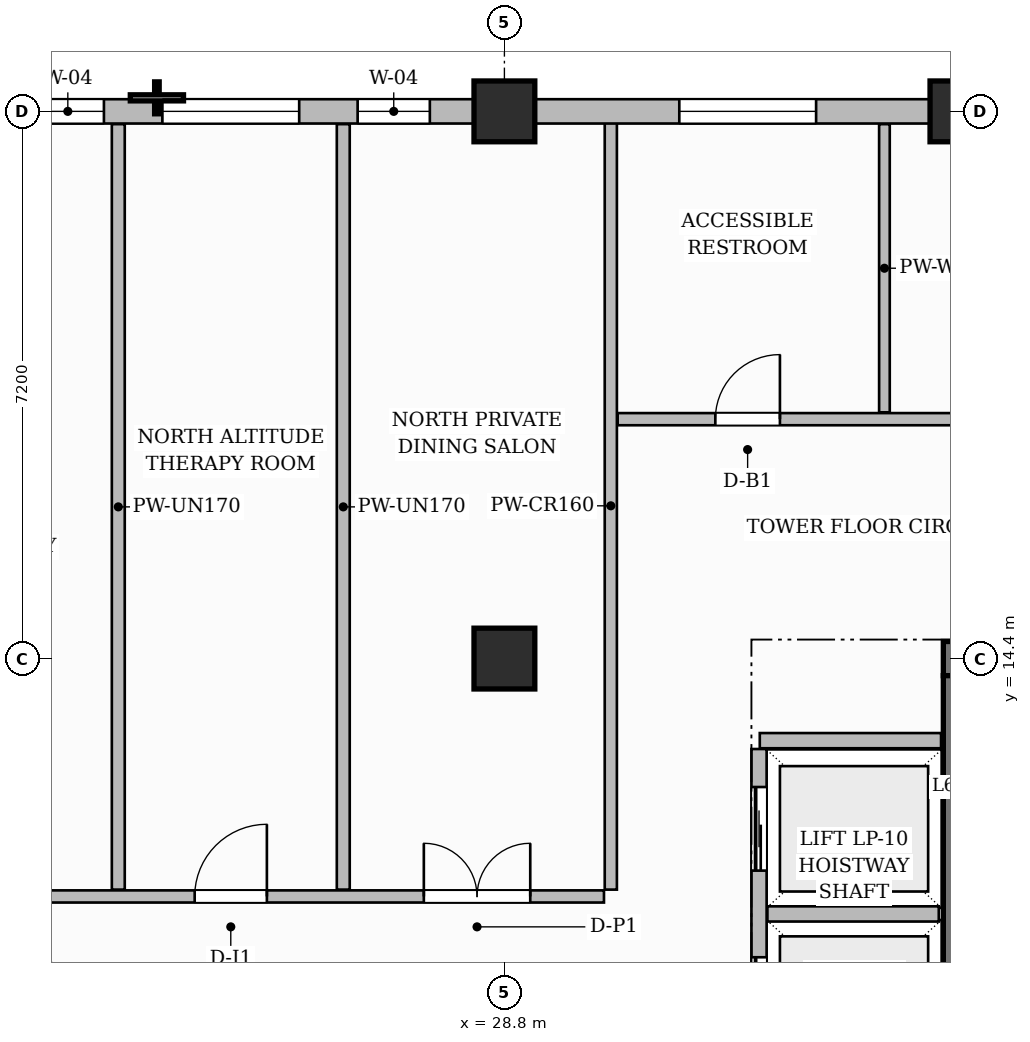
"""IFC4 building model, lengths in metres.
Left out: names, types, materials, properties, quantities, classifications, styles, units other than length and angle.
Written with IfcOpenShell. Run it as: python <this file> out.ifc"""

import sys

from ifc_helpers import new_model, si_unit, direction, frame, frame_2d, origin, origin_2d, place, context, subcontext, project, spatial, rectangle, extrude, source, transform, mapped, element, fill, save


model = new_model("IFC4")
c1 = context("Model", 3, precision=1e-05, world=origin(), true_north=direction((0.0, 1.0)))
c2 = subcontext(c1, "Body", "Model", "MODEL_VIEW")
j1 = project(units=[si_unit("LENGTHUNIT", "METRE"), si_unit("PLANEANGLEUNIT", "RADIAN")], contexts=[c1])
p1 = place(None, origin())
s1 = spatial("IfcSite", under=j1, at=p1, CompositionType="ELEMENT")
p2 = place(p1, origin())
s2 = spatial("IfcBuilding", under=s1, at=p2, CompositionType="ELEMENT")
p3 = place(p2, frame((0.0, 0.0, 263.5)))
s3 = spatial("IfcBuildingStorey", under=s2, at=p3, CompositionType="ELEMENT", Elevation=263.5)
p4 = place(p3, frame((34.575, 14.4, 0.0), z_axis=(0.0, 0.0, 1.0), x_axis=(1.0, 0.0, 0.0)))
e1 = element("IfcWall", 1, at=p4, inside=s3, PredefinedType="SHEAR", context=c2, shape_type="SweptSolid", body=[
    extrude(rectangle(XDim=15.45, YDim=0.45, at=frame_2d((7.725, 0.0))), origin(), (0.0, 0.0, 1.0), 3.85),
])
p5 = place(p4, frame((5.355, 0.0, 0.0)))
e2 = element("IfcOpeningElement", 2, at=p5, cuts=e1, PredefinedType="OPENING", context=c2, shape_type="SweptSolid", body=[
    extrude(rectangle(XDim=1.5, YDim=2.2, at=frame_2d((0.75, 1.1))), frame((0.0, 0.235, 0.0), z_axis=(0.0, -1.0, 0.0), x_axis=(1.0, 0.0, 0.0)), (0.0, 0.0, 1.0), 0.47),
])
p6 = place(p4, frame((1.57, 0.0, 0.0)))
e3 = element("IfcOpeningElement", 3, at=p6, cuts=e1, PredefinedType="OPENING", context=c2, shape_type="SweptSolid", body=[
    extrude(rectangle(XDim=1.05, YDim=2.15, at=frame_2d((0.525, 1.075))), frame((0.0, 0.235, 0.0), z_axis=(0.0, -1.0, 0.0), x_axis=(1.0, 0.0, 0.0)), (0.0, 0.0, 1.0), 0.47),
])
p7 = place(p4, frame((11.2, 0.0, 0.0)))
e4 = element("IfcOpeningElement", 4, at=p7, cuts=e1, PredefinedType="OPENING", context=c2, shape_type="SweptSolid", body=[
    extrude(rectangle(XDim=1.05, YDim=2.15, at=frame_2d((0.525, 1.075))), frame((0.0, 0.235, 0.0), z_axis=(0.0, -1.0, 0.0), x_axis=(1.0, 0.0, 0.0)), (0.0, 0.0, 1.0), 0.47),
])
p8 = place(p3, frame((34.8, 3.825, 0.0), z_axis=(0.0, 0.0, 1.0), x_axis=(0.0, 1.0, 0.0)))
e5 = element("IfcWall", 5, at=p8, inside=s3, PredefinedType="SHEAR", context=c2, shape_type="SweptSolid", body=[
    extrude(rectangle(XDim=10.35, YDim=0.45, at=frame_2d((5.175, 0.0))), origin(), (0.0, 0.0, 1.0), 3.85),
])
m1 = source(origin(), c2, "Body", "SweptSolid", [
    extrude(rectangle(XDim=0.8, YDim=0.8, at=origin_2d()), origin(), (0.0, 0.0, 1.0), 3.85),
])
for number, where, z_axis, x_axis in (
    (6, (28.8, 14.4, 0.0), (0.0, 0.0, 1.0), (1.0, 0.0, 0.0)),
    (7, (28.8, 21.6, 0.0), (0.0, 0.0, 1.0), (1.0, 0.0, 0.0)),
    (8, (34.8, 21.6, 0.0), (0.0, 0.0, 1.0), (1.0, 0.0, 0.0)),
):
    element("IfcColumn", number, at=place(p3, frame(where, z_axis=z_axis, x_axis=x_axis)), inside=s3, PredefinedType="COLUMN", context=c2, shape_type="MappedRepresentation", body=[
        mapped(m1, transform((0.0, 0.0, 0.0), scale=1.0)),
    ])
p9 = place(p3, frame((32.16, 13.32, 0.0), z_axis=(0.0, 0.0, 1.0), x_axis=(1.0, 0.0, 0.0)))
e9 = element("IfcWall", 9, at=p9, inside=s3, PredefinedType="PARTITIONING", context=c2, shape_type="SweptSolid", body=[
    extrude(rectangle(XDim=2.385, YDim=0.2, at=frame_2d((1.192, 0.0))), origin(), (0.0, 0.0, 1.0), 3.6),
])
p10 = place(p3, frame((32.15, 4.39, 0.0), z_axis=(0.0, 0.0, 1.0), x_axis=(0.0, 1.0, 0.0)))
e10 = element("IfcWall", 10, at=p10, inside=s3, PredefinedType="PARTITIONING", context=c2, shape_type="SweptSolid", body=[
    extrude(rectangle(XDim=8.82, YDim=0.2, at=frame_2d((4.41, 0.0))), origin(), (0.0, 0.0, 1.0), 3.6),
])
p11 = place(p10, frame((0.5, 0.0, 0.0)))
e11 = element("IfcOpeningElement", 11, at=p11, cuts=e10, PredefinedType="OPENING", context=c2, shape_type="SweptSolid", body=[
    extrude(rectangle(XDim=1.1, YDim=2.2, at=frame_2d((0.55, 1.1))), frame((0.0, 0.11, 0.0), z_axis=(0.0, -1.0, 0.0), x_axis=(1.0, 0.0, 0.0)), (0.0, 0.0, 1.0), 0.22),
])
p12 = place(p10, frame((2.74, 0.0, 0.0)))
e12 = element("IfcOpeningElement", 12, at=p12, cuts=e10, PredefinedType="OPENING", context=c2, shape_type="SweptSolid", body=[
    extrude(rectangle(XDim=1.1, YDim=2.2, at=frame_2d((0.55, 1.1))), frame((0.0, 0.11, 0.0), z_axis=(0.0, -1.0, 0.0), x_axis=(1.0, 0.0, 0.0)), (0.0, 0.0, 1.0), 0.22),
])
p13 = place(p10, frame((4.98, 0.0, 0.0)))
e13 = element("IfcOpeningElement", 13, at=p13, cuts=e10, PredefinedType="OPENING", context=c2, shape_type="SweptSolid", body=[
    extrude(rectangle(XDim=1.1, YDim=2.2, at=frame_2d((0.55, 1.1))), frame((0.0, 0.11, 0.0), z_axis=(0.0, -1.0, 0.0), x_axis=(1.0, 0.0, 0.0)), (0.0, 0.0, 1.0), 0.22),
])
p14 = place(p10, frame((7.22, 0.0, 0.0)))
e14 = element("IfcOpeningElement", 14, at=p14, cuts=e10, PredefinedType="OPENING", context=c2, shape_type="SweptSolid", body=[
    extrude(rectangle(XDim=1.1, YDim=2.2, at=frame_2d((0.55, 1.1))), frame((0.0, 0.11, 0.0), z_axis=(0.0, -1.0, 0.0), x_axis=(1.0, 0.0, 0.0)), (0.0, 0.0, 1.0), 0.22),
])
p15 = place(p3, frame((32.26, 11.04, 0.0), z_axis=(0.0, 0.0, 1.0), x_axis=(1.0, 0.0, 0.0)))
e15 = element("IfcWall", 15, at=p15, inside=s3, PredefinedType="PARTITIONING", context=c2, shape_type="SweptSolid", body=[
    extrude(rectangle(XDim=2.255, YDim=0.2, at=frame_2d((1.127, 0.0))), origin(), (0.0, 0.0, 1.0), 3.6),
])
p16 = place(p3, frame((18.168, 11.27, 0.0), z_axis=(0.0, 0.0, 1.0), x_axis=(1.0, 0.0, 0.0)))
e16 = element("IfcWall", 16, at=p16, inside=s3, PredefinedType="PARTITIONING", context=c2, shape_type="SweptSolid", body=[
    extrude(rectangle(XDim=11.942, YDim=0.16, at=frame_2d((5.971, 0.0))), origin(), (0.0, 0.0, 1.0), 3.6),
])
p17 = place(p16, frame((2.217, 0.0, 0.0)))
e17 = element("IfcOpeningElement", 17, at=p17, cuts=e16, PredefinedType="OPENING", context=c2, shape_type="SweptSolid", body=[
    extrude(rectangle(XDim=0.95, YDim=2.15, at=frame_2d((0.475, 1.075))), frame((0.0, 0.09, 0.0), z_axis=(0.0, -1.0, 0.0), x_axis=(1.0, 0.0, 0.0)), (0.0, 0.0, 1.0), 0.18),
])
p18 = place(p16, frame((6.557, 0.0, 0.0)))
e18 = element("IfcOpeningElement", 18, at=p18, cuts=e16, PredefinedType="OPENING", context=c2, shape_type="SweptSolid", body=[
    extrude(rectangle(XDim=0.95, YDim=2.15, at=frame_2d((0.475, 1.075))), frame((0.0, 0.09, 0.0), z_axis=(0.0, -1.0, 0.0), x_axis=(1.0, 0.0, 0.0)), (0.0, 0.0, 1.0), 0.18),
])
p19 = place(p16, frame((9.572, 0.0, 0.0)))
e19 = element("IfcOpeningElement", 19, at=p19, cuts=e16, PredefinedType="OPENING", context=c2, shape_type="SweptSolid", body=[
    extrude(rectangle(XDim=1.4, YDim=2.35, at=frame_2d((0.7, 1.175))), frame((0.0, 0.09, 0.0), z_axis=(0.0, -1.0, 0.0), x_axis=(1.0, 0.0, 0.0)), (0.0, 0.0, 1.0), 0.18),
])
p20 = place(p3, frame((30.2, 11.36, 0.0), z_axis=(0.0, 0.0, 1.0), x_axis=(0.0, 1.0, 0.0)))
e20 = element("IfcWall", 20, at=p20, inside=s3, PredefinedType="PARTITIONING", context=c2, shape_type="SweptSolid", body=[
    extrude(rectangle(XDim=10.1, YDim=0.16, at=frame_2d((5.05, 0.0))), origin(), (0.0, 0.0, 1.0), 3.6),
])
p21 = place(p3, frame((30.29, 17.55, 0.0), z_axis=(0.0, 0.0, 1.0), x_axis=(1.0, 0.0, 0.0)))
e21 = element("IfcWall", 21, at=p21, inside=s3, PredefinedType="PARTITIONING", context=c2, shape_type="SweptSolid", body=[
    extrude(rectangle(XDim=19.37, YDim=0.16, at=frame_2d((9.685, 0.0))), origin(), (0.0, 0.0, 1.0), 3.6),
])
p22 = place(p21, frame((1.285, 0.0, 0.0)))
e22 = element("IfcOpeningElement", 22, at=p22, cuts=e21, PredefinedType="OPENING", context=c2, shape_type="SweptSolid", body=[
    extrude(rectangle(XDim=0.85, YDim=2.1, at=frame_2d((0.425, 1.05))), frame((0.0, 0.09, 0.0), z_axis=(0.0, -1.0, 0.0), x_axis=(1.0, 0.0, 0.0)), (0.0, 0.0, 1.0), 0.18),
])
p23 = place(p21, frame((10.66, 0.0, 0.0)))
e23 = element("IfcOpeningElement", 23, at=p23, cuts=e21, PredefinedType="OPENING", context=c2, shape_type="SweptSolid", body=[
    extrude(rectangle(XDim=1.6, YDim=2.4, at=frame_2d((0.8, 1.2))), frame((0.0, 0.09, 0.0), z_axis=(0.0, -1.0, 0.0), x_axis=(1.0, 0.0, 0.0)), (0.0, 0.0, 1.0), 0.18),
])
p24 = place(p3, frame((33.8, 17.64, 0.0), z_axis=(0.0, 0.0, 1.0), x_axis=(0.0, 1.0, 0.0)))
e24 = element("IfcWall", 24, at=p24, inside=s3, PredefinedType="PARTITIONING", context=c2, shape_type="SweptSolid", body=[
    extrude(rectangle(XDim=3.792, YDim=0.14, at=frame_2d((1.896, 0.0))), origin(), (0.0, 0.0, 1.0), 3.6),
])
for number, where, z_axis, x_axis in (
    (25, (23.72, 11.36, 0.0), (0.0, 0.0, 1.0), (0.0, 1.0, 0.0)),
    (26, (26.68, 11.36, 0.0), (0.0, 0.0, 1.0), (0.0, 1.0, 0.0)),
):
    element("IfcWall", number, at=place(p3, frame(where, z_axis=z_axis, x_axis=x_axis)), inside=s3, PredefinedType="PARTITIONING", context=c2, shape_type="SweptSolid", body=[
        extrude(rectangle(XDim=10.072, YDim=0.17, at=frame_2d((5.036, 0.0))), origin(), (0.0, 0.0, 1.0), 3.6),
    ])
p25 = place(p3, frame((18.0, 21.6, 0.0), z_axis=(0.0, 0.0, 1.0), x_axis=(1.0, 0.0, 0.0)))
e27 = element("IfcWall", 27, at=p25, inside=s3, PredefinedType="SOLIDWALL", context=c2, shape_type="SweptSolid", body=[
    extrude(rectangle(XDim=31.8, YDim=0.32, at=frame_2d((15.9, 0.0))), origin(), (0.0, 0.0, 1.0), 3.185),
])
p26 = place(p25, frame((0.42, 0.0, 0.0)))
e28 = element("IfcOpeningElement", 28, at=p26, cuts=e27, PredefinedType="OPENING", context=c2, shape_type="SweptSolid", body=[
    extrude(rectangle(XDim=1.2, YDim=2.2, at=frame_2d((0.6, 1.1))), frame((0.0, 0.17, 0.0), z_axis=(0.0, -1.0, 0.0), x_axis=(1.0, 0.0, 0.0)), (0.0, 0.0, 1.0), 0.34),
])
p27 = place(p25, frame((4.581, 0.0, 0.8)))
e29 = element("IfcOpeningElement", 29, at=p27, cuts=e27, PredefinedType="OPENING", context=c2, shape_type="SweptSolid", body=[
    extrude(rectangle(XDim=0.95, YDim=1.75, at=frame_2d((0.475, 0.875))), frame((0.0, 0.17, 0.0), z_axis=(0.0, -1.0, 0.0), x_axis=(1.0, 0.0, 0.0)), (0.0, 0.0, 1.0), 0.34),
])
p28 = place(p25, frame((6.3, 0.0, 0.8)))
e30 = element("IfcOpeningElement", 30, at=p28, cuts=e27, PredefinedType="OPENING", context=c2, shape_type="SweptSolid", body=[
    extrude(rectangle(XDim=1.8, YDim=1.85, at=frame_2d((0.9, 0.925))), frame((0.0, 0.17, 0.0), z_axis=(0.0, -1.0, 0.0), x_axis=(1.0, 0.0, 0.0)), (0.0, 0.0, 1.0), 0.34),
])
p29 = place(p25, frame((8.869, 0.0, 0.8)))
e31 = element("IfcOpeningElement", 31, at=p29, cuts=e27, PredefinedType="OPENING", context=c2, shape_type="SweptSolid", body=[
    extrude(rectangle(XDim=0.95, YDim=1.75, at=frame_2d((0.475, 0.875))), frame((0.0, 0.17, 0.0), z_axis=(0.0, -1.0, 0.0), x_axis=(1.0, 0.0, 0.0)), (0.0, 0.0, 1.0), 0.34),
])
p30 = place(p25, frame((13.101, 0.0, 0.8)))
e32 = element("IfcOpeningElement", 32, at=p30, cuts=e27, PredefinedType="OPENING", context=c2, shape_type="SweptSolid", body=[
    extrude(rectangle(XDim=1.8, YDim=1.85, at=frame_2d((0.9, 0.925))), frame((0.0, 0.17, 0.0), z_axis=(0.0, -1.0, 0.0), x_axis=(1.0, 0.0, 0.0)), (0.0, 0.0, 1.0), 0.34),
])
p31 = place(p25, frame((18.125, 0.0, 0.8)))
e33 = element("IfcOpeningElement", 33, at=p31, cuts=e27, PredefinedType="OPENING", context=c2, shape_type="SweptSolid", body=[
    extrude(rectangle(XDim=1.8, YDim=1.85, at=frame_2d((0.9, 0.925))), frame((0.0, 0.17, 0.0), z_axis=(0.0, -1.0, 0.0), x_axis=(1.0, 0.0, 0.0)), (0.0, 0.0, 1.0), 0.34),
])
p32 = place(p25, frame((20.875, 0.0, 0.8)))
e34 = element("IfcOpeningElement", 34, at=p32, cuts=e27, PredefinedType="OPENING", context=c2, shape_type="SweptSolid", body=[
    extrude(rectangle(XDim=1.8, YDim=1.85, at=frame_2d((0.9, 0.925))), frame((0.0, 0.17, 0.0), z_axis=(0.0, -1.0, 0.0), x_axis=(1.0, 0.0, 0.0)), (0.0, 0.0, 1.0), 0.34),
])
p33 = place(p25, frame((25.475, 0.0, 0.8)))
e35 = element("IfcOpeningElement", 35, at=p33, cuts=e27, PredefinedType="OPENING", context=c2, shape_type="SweptSolid", body=[
    extrude(rectangle(XDim=1.8, YDim=1.85, at=frame_2d((0.9, 0.925))), frame((0.0, 0.17, 0.0), z_axis=(0.0, -1.0, 0.0), x_axis=(1.0, 0.0, 0.0)), (0.0, 0.0, 1.0), 0.34),
])
p34 = place(p25, frame((28.525, 0.0, 0.8)))
e36 = element("IfcOpeningElement", 36, at=p34, cuts=e27, PredefinedType="OPENING", context=c2, shape_type="SweptSolid", body=[
    extrude(rectangle(XDim=1.8, YDim=1.85, at=frame_2d((0.9, 0.925))), frame((0.0, 0.17, 0.0), z_axis=(0.0, -1.0, 0.0), x_axis=(1.0, 0.0, 0.0)), (0.0, 0.0, 1.0), 0.34),
])
m2 = source(origin(), c2, "Body", "SweptSolid", [
    extrude(rectangle(XDim=0.85, YDim=2.1, at=frame_2d((0.425, 1.05))), frame((0.0, 0.025, 0.0), z_axis=(0.0, -1.0, 0.0), x_axis=(1.0, 0.0, 0.0)), (0.0, 0.0, 1.0), 0.05),
])
p35 = place(p22, origin())
e37 = element("IfcDoor", 37, at=p35, inside=s3, OperationType="SINGLE_SWING_RIGHT", PredefinedType="DOOR", context=c2, shape_type="MappedRepresentation", body=[
    mapped(m2, transform((0.0, 0.0, 0.0), scale=1.0)),
])
fill(e22, e37)
m3 = source(origin(), c2, "Body", "SweptSolid", [
    extrude(rectangle(XDim=0.95, YDim=2.15, at=frame_2d((0.475, 1.075))), frame((0.0, 0.025, 0.0), z_axis=(0.0, -1.0, 0.0), x_axis=(1.0, 0.0, 0.0)), (0.0, 0.0, 1.0), 0.05),
])
p36 = place(p18, origin())
e38 = element("IfcDoor", 38, at=p36, inside=s3, OperationType="SINGLE_SWING_RIGHT", PredefinedType="DOOR", context=c2, shape_type="MappedRepresentation", body=[
    mapped(m3, transform((0.0, 0.0, 0.0), scale=1.0)),
])
fill(e18, e38)
m4 = source(origin(), c2, "Body", "SweptSolid", [
    extrude(rectangle(XDim=1.4, YDim=2.35, at=frame_2d((0.7, 1.175))), frame((0.0, 0.025, 0.0), z_axis=(0.0, -1.0, 0.0), x_axis=(1.0, 0.0, 0.0)), (0.0, 0.0, 1.0), 0.05),
])
p37 = place(p19, origin())
e39 = element("IfcDoor", 39, at=p37, inside=s3, OperationType="DOUBLE_DOOR_SINGLE_SWING", PredefinedType="DOOR", context=c2, shape_type="MappedRepresentation", body=[
    mapped(m4, transform((0.0, 0.0, 0.0), scale=1.0)),
])
fill(e19, e39)
m5 = source(origin(), c2, "Body", "SweptSolid", [
    extrude(rectangle(XDim=1.1, YDim=2.2, at=frame_2d((0.55, 1.1))), frame((0.0, 0.025, 0.0), z_axis=(0.0, -1.0, 0.0), x_axis=(1.0, 0.0, 0.0)), (0.0, 0.0, 1.0), 0.05),
])
p38 = place(p13, origin())
e40 = element("IfcDoor", 40, at=p38, inside=s3, OperationType="SLIDING_TO_LEFT", PredefinedType="DOOR", context=c2, shape_type="MappedRepresentation", body=[
    mapped(m5, transform((0.0, 0.0, 0.0), scale=1.0)),
])
fill(e13, e40)
p39 = place(p14, origin())
e41 = element("IfcDoor", 41, at=p39, inside=s3, OperationType="SLIDING_TO_LEFT", PredefinedType="DOOR", context=c2, shape_type="MappedRepresentation", body=[
    mapped(m5, transform((0.0, 0.0, 0.0), scale=1.0)),
])
fill(e14, e41)
m6 = source(origin(), c2, "Body", "SweptSolid", [
    extrude(rectangle(XDim=0.95, YDim=1.75, at=frame_2d((0.475, 0.875))), frame((0.0, 0.03, 0.0), z_axis=(0.0, -1.0, 0.0), x_axis=(1.0, 0.0, 0.0)), (0.0, 0.0, 1.0), 0.06),
])
p40 = place(p27, origin())
e42 = element("IfcWindow", 42, at=p40, inside=s3, PartitioningType="SINGLE_PANEL", PredefinedType="WINDOW", context=c2, shape_type="MappedRepresentation", body=[
    mapped(m6, transform((0.0, 0.0, 0.0), scale=1.0)),
])
fill(e29, e42)
m7 = source(origin(), c2, "Body", "SweptSolid", [
    extrude(rectangle(XDim=1.8, YDim=1.85, at=frame_2d((0.9, 0.925))), frame((0.0, 0.03, 0.0), z_axis=(0.0, -1.0, 0.0), x_axis=(1.0, 0.0, 0.0)), (0.0, 0.0, 1.0), 0.06),
])
p41 = place(p28, origin())
e43 = element("IfcWindow", 43, at=p41, inside=s3, PartitioningType="DOUBLE_PANEL_VERTICAL", PredefinedType="WINDOW", context=c2, shape_type="MappedRepresentation", body=[
    mapped(m7, transform((0.0, 0.0, 0.0), scale=1.0)),
])
fill(e30, e43)
p42 = place(p29, origin())
e44 = element("IfcWindow", 44, at=p42, inside=s3, PartitioningType="SINGLE_PANEL", PredefinedType="WINDOW", context=c2, shape_type="MappedRepresentation", body=[
    mapped(m6, transform((0.0, 0.0, 0.0), scale=1.0)),
])
fill(e31, e44)
p43 = place(p30, origin())
e45 = element("IfcWindow", 45, at=p43, inside=s3, PartitioningType="DOUBLE_PANEL_VERTICAL", PredefinedType="WINDOW", context=c2, shape_type="MappedRepresentation", body=[
    mapped(m7, transform((0.0, 0.0, 0.0), scale=1.0)),
])
fill(e32, e45)
save(model, sys.argv[1])
